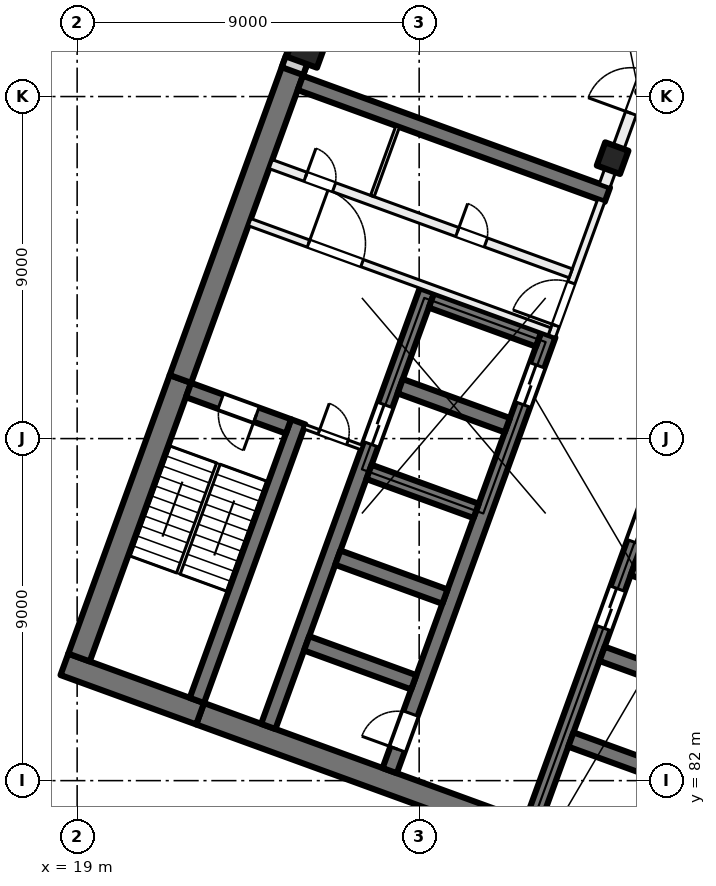
"""IFC4 building model, lengths in metres.
Left out: names, types, materials, properties, quantities, classifications, styles, units other than length and angle.
Written with IfcOpenShell. Run it as: python <this file> out.ifc"""

import sys

from ifc_helpers import new_model, si_unit, direction, frame, frame_2d, origin, origin_2d, place, context, subcontext, project, spatial, rectangle, extrude, element, fill, save


model = new_model("IFC4")
c1 = context("Model", 3, precision=1e-05, world=origin(), true_north=direction((0.0, 1.0)))
c2 = subcontext(c1, "Body", "Model", "MODEL_VIEW")
j1 = project(units=[si_unit("LENGTHUNIT", "METRE"), si_unit("PLANEANGLEUNIT", "RADIAN")], contexts=[c1])
p1 = place(None, origin())
s1 = spatial("IfcSite", under=j1, at=p1, CompositionType="ELEMENT")
p2 = place(p1, origin())
s2 = spatial("IfcBuilding", under=s1, at=p2, CompositionType="ELEMENT")
p3 = place(p2, frame((0.0, 0.0, 113.0)))
s3 = spatial("IfcBuildingStorey", under=s2, at=p3, CompositionType="ELEMENT", Elevation=113.0)
p4 = place(p3, frame((33.091, 98.379, 0.0), z_axis=(0.0, 0.0, 1.0), x_axis=(-0.342020143326, -0.939692620786, 0.0)))
e1 = element("IfcColumn", 1, at=p4, inside=s3, PredefinedType="COLUMN", context=c2, shape_type="SweptSolid", body=[
    extrude(rectangle(XDim=0.65, YDim=0.65, at=origin_2d()), origin(), (0.0, 0.0, 1.0), 4.0),
])
p5 = place(p3, frame((25.056, 101.303, 0.0), z_axis=(0.0, 0.0, 1.0), x_axis=(-0.342020143326, -0.939692620786, 0.0)))
e2 = element("IfcColumn", 2, at=p5, inside=s3, PredefinedType="COLUMN", context=c2, shape_type="SweptSolid", body=[
    extrude(rectangle(XDim=0.85, YDim=0.85, at=origin_2d()), origin(), (0.0, 0.0, 1.0), 4.0),
])
p6 = place(p3, frame((35.767, 78.835, 0.0), z_axis=(0.0, 0.0, 1.0), x_axis=(-0.939692894512, 0.342019391267, 0.0)))
e3 = element("IfcWall", 3, at=p6, inside=s3, PredefinedType="SHEAR", context=c2, shape_type="SweptSolid", body=[
    extrude(rectangle(XDim=14.4, YDim=0.6, at=frame_2d((7.2, 0.0))), origin(), (0.0, 0.0, 1.0), 4.0),
])
p7 = place(p3, frame((22.236, 83.76, 0.0), z_axis=(0.0, 0.0, 1.0), x_axis=(-0.939680822529, 0.342052557032, 0.0)))
e4 = element("IfcWall", 4, at=p7, inside=s3, PredefinedType="SHEAR", context=c2, shape_type="SweptSolid", body=[
    extrude(rectangle(XDim=3.8, YDim=0.6, at=frame_2d((1.9, 0.0))), origin(), (0.0, 0.0, 1.0), 4.0),
])
p8 = place(p3, frame((19.05, 85.239, 0.0), z_axis=(0.0, 0.0, 1.0), x_axis=(0.342016982193, 0.939693771338, 0.0)))
e5 = element("IfcWall", 5, at=p8, inside=s3, PredefinedType="SHEAR", context=c2, shape_type="SweptSolid", body=[
    extrude(rectangle(XDim=7.8, YDim=0.6, at=frame_2d((3.9, 0.0))), origin(), (0.0, 0.0, 1.0), 4.0),
])
p9 = place(p3, frame((21.717, 92.568, 0.0), z_axis=(0.0, 0.0, 1.0), x_axis=(0.342017595281, 0.939693548195, 0.0)))
e6 = element("IfcWall", 6, at=p9, inside=s3, PredefinedType="SHEAR", context=c2, shape_type="SweptSolid", body=[
    extrude(rectangle(XDim=8.925, YDim=0.6, at=frame_2d((4.462, 0.0))), origin(), (0.0, 0.0, 1.0), 4.0),
])
p10 = place(p3, frame((22.15, 84.11, 0.0), z_axis=(0.0, 0.0, 1.0), x_axis=(0.342016982193, 0.939693771338, 0.0)))
e7 = element("IfcWall", 7, at=p10, inside=s3, PredefinedType="SHEAR", context=c2, shape_type="SweptSolid", body=[
    extrude(rectangle(XDim=7.8, YDim=0.4, at=frame_2d((3.9, 0.0))), origin(), (0.0, 0.0, 1.0), 4.0),
])
p11 = place(p3, frame((24.562, 91.32, 0.0), z_axis=(0.0, 0.0, 1.0), x_axis=(-0.939717030584, 0.341953070509, 0.0)))
e8 = element("IfcWall", 8, at=p11, inside=s3, PredefinedType="SHEAR", context=c2, shape_type="SweptSolid", body=[
    extrude(rectangle(XDim=2.8, YDim=0.4, at=frame_2d((1.4, 0.0))), origin(), (0.0, 0.0, 1.0), 4.0),
])
p12 = place(p11, frame((0.9, 0.0, 0.0)))
e9 = element("IfcOpeningElement", 9, at=p12, cuts=e8, PredefinedType="OPENING", context=c2, shape_type="SweptSolid", body=[
    extrude(rectangle(XDim=1.0, YDim=2.1, at=frame_2d((0.5, 1.05))), frame((0.0, 0.21, 0.0), z_axis=(0.0, -1.0, 0.0), x_axis=(1.0, 0.0, 0.0)), (0.0, 0.0, 1.0), 0.42),
])
p13 = place(p3, frame((30.984, 80.895, 0.0), z_axis=(0.0, 0.0, 1.0), x_axis=(0.342021021735, 0.939692301071, 0.0)))
e10 = element("IfcWall", 10, at=p13, inside=s3, PredefinedType="SHEAR", context=c2, shape_type="SweptSolid", body=[
    extrude(rectangle(XDim=12.2, YDim=0.4, at=frame_2d((6.1, 0.0))), origin(), (0.0, 0.0, 1.0), 4.0),
])
p14 = place(p13, frame((5.45, 0.0, 0.0)))
e11 = element("IfcOpeningElement", 11, at=p14, cuts=e10, PredefinedType="OPENING", context=c2, shape_type="SweptSolid", body=[
    extrude(rectangle(XDim=1.1, YDim=2.1, at=frame_2d((0.55, 1.05))), frame((0.0, 0.21, 0.0), z_axis=(0.0, -1.0, 0.0), x_axis=(1.0, 0.0, 0.0)), (0.0, 0.0, 1.0), 0.42),
])
p15 = place(p13, frame((7.85, 0.0, 0.0)))
e12 = element("IfcOpeningElement", 12, at=p15, cuts=e10, PredefinedType="OPENING", context=c2, shape_type="SweptSolid", body=[
    extrude(rectangle(XDim=1.1, YDim=2.1, at=frame_2d((0.55, 1.05))), frame((0.0, 0.21, 0.0), z_axis=(0.0, -1.0, 0.0), x_axis=(1.0, 0.0, 0.0)), (0.0, 0.0, 1.0), 0.42),
])
p16 = place(p13, frame((10.25, 0.0, 0.0)))
e13 = element("IfcOpeningElement", 13, at=p16, cuts=e10, PredefinedType="OPENING", context=c2, shape_type="SweptSolid", body=[
    extrude(rectangle(XDim=1.1, YDim=2.1, at=frame_2d((0.55, 1.05))), frame((0.0, 0.21, 0.0), z_axis=(0.0, -1.0, 0.0), x_axis=(1.0, 0.0, 0.0)), (0.0, 0.0, 1.0), 0.42),
])
for number, where, z_axis, x_axis in (
    (14, (34.812, 82.056, 0.0), (0.0, 0.0, 1.0), (-0.94, 0.342, 0.0)),
    (15, (35.632, 84.311, 0.0), (0.0, 0.0, 1.0), (-0.94, 0.342, 0.0)),
    (16, (36.453, 86.566, 0.0), (0.0, 0.0, 1.0), (-0.94, 0.342, 0.0)),
):
    element("IfcWall", number, at=place(p3, frame(where, z_axis=z_axis, x_axis=x_axis)), inside=s3, PredefinedType="SHEAR", context=c2, shape_type="SweptSolid", body=[
        extrude(rectangle(XDim=3.0, YDim=0.4, at=frame_2d((1.5, 0.0))), origin(), (0.0, 0.0, 1.0), 4.0),
    ])
p17 = place(p3, frame((27.225, 82.263, 0.0), z_axis=(0.0, 0.0, 1.0), x_axis=(0.342014590177, 0.939694641948, 0.0)))
e17 = element("IfcWall", 17, at=p17, inside=s3, PredefinedType="SHEAR", context=c2, shape_type="SweptSolid", body=[
    extrude(rectangle(XDim=12.2, YDim=0.4, at=frame_2d((6.1, 0.0))), origin(), (0.0, 0.0, 1.0), 4.0),
])
p18 = place(p17, frame((10.25, 0.0, 0.0)))
e18 = element("IfcOpeningElement", 18, at=p18, cuts=e17, PredefinedType="OPENING", context=c2, shape_type="SweptSolid", body=[
    extrude(rectangle(XDim=1.1, YDim=2.1, at=frame_2d((0.55, 1.05))), frame((0.0, 0.21, 0.0), z_axis=(0.0, -1.0, 0.0), x_axis=(1.0, 0.0, 0.0)), (0.0, 0.0, 1.0), 0.42),
])
p19 = place(p17, frame((0.6, 0.0, 0.0)))
e19 = element("IfcOpeningElement", 19, at=p19, cuts=e17, PredefinedType="OPENING", context=c2, shape_type="SweptSolid", body=[
    extrude(rectangle(XDim=1.0, YDim=2.1, at=frame_2d((0.5, 1.05))), frame((0.0, 0.21, 0.0), z_axis=(0.0, -1.0, 0.0), x_axis=(1.0, 0.0, 0.0)), (0.0, 0.0, 1.0), 0.42),
])
p20 = place(p3, frame((24.03, 83.426, 0.0), z_axis=(0.0, 0.0, 1.0), x_axis=(0.342014590177, 0.939694641948, 0.0)))
e20 = element("IfcWall", 20, at=p20, inside=s3, PredefinedType="SHEAR", context=c2, shape_type="SweptSolid", body=[
    extrude(rectangle(XDim=12.2, YDim=0.4, at=frame_2d((6.1, 0.0))), origin(), (0.0, 0.0, 1.0), 4.0),
])
p21 = place(p20, frame((7.9, 0.0, 0.0)))
e21 = element("IfcOpeningElement", 21, at=p21, cuts=e20, PredefinedType="OPENING", context=c2, shape_type="SweptSolid", body=[
    extrude(rectangle(XDim=1.1, YDim=2.1, at=frame_2d((0.55, 1.05))), frame((0.0, 0.21, 0.0), z_axis=(0.0, -1.0, 0.0), x_axis=(1.0, 0.0, 0.0)), (0.0, 0.0, 1.0), 0.42),
])
p22 = place(p3, frame((27.858, 84.587, 0.0), z_axis=(0.0, 0.0, 1.0), x_axis=(-0.939686455819, 0.342037080957, 0.0)))
e22 = element("IfcWall", 22, at=p22, inside=s3, PredefinedType="SHEAR", context=c2, shape_type="SweptSolid", body=[
    extrude(rectangle(XDim=3.0, YDim=0.4, at=frame_2d((1.5, 0.0))), origin(), (0.0, 0.0, 1.0), 4.0),
])
p23 = place(p3, frame((28.678, 86.842, 0.0), z_axis=(0.0, 0.0, 1.0), x_axis=(-0.939676934218, 0.342063238742, 0.0)))
e23 = element("IfcWall", 23, at=p23, inside=s3, PredefinedType="SHEAR", context=c2, shape_type="SweptSolid", body=[
    extrude(rectangle(XDim=3.0, YDim=0.4, at=frame_2d((1.5, 0.0))), origin(), (0.0, 0.0, 1.0), 4.0),
])
for number, where, z_axis, x_axis in (
    (24, (29.5, 89.097, 0.0), (0.0, 0.0, 1.0), (-0.94, 0.342, 0.0)),
    (25, (30.32, 91.353, 0.0), (0.0, 0.0, 1.0), (-0.94, 0.342, 0.0)),
    (26, (31.141, 93.608, 0.0), (0.0, 0.0, 1.0), (-0.94, 0.342, 0.0)),
):
    element("IfcWall", number, at=place(p3, frame(where, z_axis=z_axis, x_axis=x_axis)), inside=s3, PredefinedType="SHEAR", context=c2, shape_type="SweptSolid", body=[
        extrude(rectangle(XDim=3.0, YDim=0.4, at=frame_2d((1.5, 0.0))), origin(), (0.0, 0.0, 1.0), 4.0),
    ])
p24 = place(p3, frame((32.953, 97.418, 0.0), z_axis=(0.0, 0.0, 1.0), x_axis=(-0.93969060187, 0.342025690201, 0.0)))
e27 = element("IfcWall", 27, at=p24, inside=s3, PredefinedType="SHEAR", context=c2, shape_type="SweptSolid", body=[
    extrude(rectangle(XDim=8.6, YDim=0.4, at=frame_2d((4.3, 0.0))), origin(), (0.0, 0.0, 1.0), 4.0),
])
p25 = place(p3, frame((24.666, 100.669, 0.0), z_axis=(0.0, 0.0, 1.0), x_axis=(0.34201964167, 0.939692803373, 0.0)))
e28 = element("IfcWall", 28, at=p25, inside=s3, PredefinedType="SOLIDWALL", context=c2, shape_type="SweptSolid", body=[
    extrude(rectangle(XDim=32.884, YDim=0.6, at=frame_2d((16.442, 0.0))), origin(), (0.0, 0.0, 1.0), 3.625),
])
p26 = place(p25, frame((1.48, 0.0, 0.9)))
e29 = element("IfcOpeningElement", 29, at=p26, cuts=e28, PredefinedType="OPENING", context=c2, shape_type="SweptSolid", body=[
    extrude(rectangle(XDim=3.0, YDim=2.4, at=frame_2d((1.5, 1.2))), frame((0.0, 0.31, 0.0), z_axis=(0.0, -1.0, 0.0), x_axis=(1.0, 0.0, 0.0)), (0.0, 0.0, 1.0), 0.62),
])
p27 = place(p25, frame((5.98, 0.0, 0.9)))
e30 = element("IfcOpeningElement", 30, at=p27, cuts=e28, PredefinedType="OPENING", context=c2, shape_type="SweptSolid", body=[
    extrude(rectangle(XDim=3.0, YDim=2.4, at=frame_2d((1.5, 1.2))), frame((0.0, 0.31, 0.0), z_axis=(0.0, -1.0, 0.0), x_axis=(1.0, 0.0, 0.0)), (0.0, 0.0, 1.0), 0.62),
])
p28 = place(p25, frame((10.48, 0.0, 0.9)))
e31 = element("IfcOpeningElement", 31, at=p28, cuts=e28, PredefinedType="OPENING", context=c2, shape_type="SweptSolid", body=[
    extrude(rectangle(XDim=3.0, YDim=2.4, at=frame_2d((1.5, 1.2))), frame((0.0, 0.31, 0.0), z_axis=(0.0, -1.0, 0.0), x_axis=(1.0, 0.0, 0.0)), (0.0, 0.0, 1.0), 0.62),
])
p29 = place(p25, frame((14.98, 0.0, 0.9)))
e32 = element("IfcOpeningElement", 32, at=p29, cuts=e28, PredefinedType="OPENING", context=c2, shape_type="SweptSolid", body=[
    extrude(rectangle(XDim=3.0, YDim=2.4, at=frame_2d((1.5, 1.2))), frame((0.0, 0.31, 0.0), z_axis=(0.0, -1.0, 0.0), x_axis=(1.0, 0.0, 0.0)), (0.0, 0.0, 1.0), 0.62),
])
p30 = place(p25, frame((19.48, 0.0, 0.9)))
e33 = element("IfcOpeningElement", 33, at=p30, cuts=e28, PredefinedType="OPENING", context=c2, shape_type="SweptSolid", body=[
    extrude(rectangle(XDim=3.0, YDim=2.4, at=frame_2d((1.5, 1.2))), frame((0.0, 0.31, 0.0), z_axis=(0.0, -1.0, 0.0), x_axis=(1.0, 0.0, 0.0)), (0.0, 0.0, 1.0), 0.62),
])
p31 = place(p25, frame((23.98, 0.0, 0.9)))
e34 = element("IfcOpeningElement", 34, at=p31, cuts=e28, PredefinedType="OPENING", context=c2, shape_type="SweptSolid", body=[
    extrude(rectangle(XDim=3.0, YDim=2.4, at=frame_2d((1.5, 1.2))), frame((0.0, 0.31, 0.0), z_axis=(0.0, -1.0, 0.0), x_axis=(1.0, 0.0, 0.0)), (0.0, 0.0, 1.0), 0.62),
])
p32 = place(p25, frame((28.48, 0.0, 0.9)))
e35 = element("IfcOpeningElement", 35, at=p32, cuts=e28, PredefinedType="OPENING", context=c2, shape_type="SweptSolid", body=[
    extrude(rectangle(XDim=3.0, YDim=2.4, at=frame_2d((1.5, 1.2))), frame((0.0, 0.31, 0.0), z_axis=(0.0, -1.0, 0.0), x_axis=(1.0, 0.0, 0.0)), (0.0, 0.0, 1.0), 0.62),
])
p33 = place(p3, frame((31.491, 93.693, 0.0), z_axis=(0.0, 0.0, 1.0), x_axis=(0.341995824804, 0.939701471648, 0.0)))
e36 = element("IfcWall", 36, at=p33, inside=s3, PredefinedType="PARTITIONING", context=c2, shape_type="SweptSolid", body=[
    extrude(rectangle(XDim=3.8, YDim=0.2, at=frame_2d((1.9, 0.0))), origin(), (0.0, 0.0, 1.0), 3.625),
])
p34 = place(p33, frame((0.3, 0.0, 0.0)))
e37 = element("IfcOpeningElement", 37, at=p34, cuts=e36, PredefinedType="OPENING", context=c2, shape_type="SweptSolid", body=[
    extrude(rectangle(XDim=1.2, YDim=2.1, at=frame_2d((0.6, 1.05))), frame((0.0, 0.11, 0.0), z_axis=(0.0, -1.0, 0.0), x_axis=(1.0, 0.0, 0.0)), (0.0, 0.0, 1.0), 0.22),
])
p35 = place(p3, frame((23.538, 96.694, 0.0), z_axis=(0.0, 0.0, 1.0), x_axis=(0.939691552312, -0.342023078919, 0.0)))
e38 = element("IfcWall", 38, at=p35, inside=s3, PredefinedType="PARTITIONING", context=c2, shape_type="SweptSolid", body=[
    extrude(rectangle(XDim=8.4, YDim=0.2, at=frame_2d((4.2, 0.0))), origin(), (0.0, 0.0, 1.0), 3.625),
])
p36 = place(p35, frame((1.65, 0.0, 0.0)))
e39 = element("IfcOpeningElement", 39, at=p36, cuts=e38, PredefinedType="OPENING", context=c2, shape_type="SweptSolid", body=[
    extrude(rectangle(XDim=1.5, YDim=2.1, at=frame_2d((0.75, 1.05))), frame((0.0, 0.11, 0.0), z_axis=(0.0, -1.0, 0.0), x_axis=(1.0, 0.0, 0.0)), (0.0, 0.0, 1.0), 0.22),
])
p37 = place(p3, frame((24.094, 98.221, 0.0), z_axis=(0.0, 0.0, 1.0), x_axis=(0.939691552312, -0.342023078919, 0.0)))
e40 = element("IfcWall", 40, at=p37, inside=s3, PredefinedType="PARTITIONING", context=c2, shape_type="SweptSolid", body=[
    extrude(rectangle(XDim=8.4, YDim=0.25, at=frame_2d((4.2, 0.0))), origin(), (0.0, 0.0, 1.0), 3.625),
])
p38 = place(p37, frame((5.225, 0.0, 0.0)))
e41 = element("IfcOpeningElement", 41, at=p38, cuts=e40, PredefinedType="OPENING", context=c2, shape_type="SweptSolid", body=[
    extrude(rectangle(XDim=0.8, YDim=2.1, at=frame_2d((0.4, 1.05))), frame((0.0, 0.135, 0.0), z_axis=(0.0, -1.0, 0.0), x_axis=(1.0, 0.0, 0.0)), (0.0, 0.0, 1.0), 0.27),
])
p39 = place(p37, frame((0.975, 0.0, 0.0)))
e42 = element("IfcOpeningElement", 42, at=p39, cuts=e40, PredefinedType="OPENING", context=c2, shape_type="SweptSolid", body=[
    extrude(rectangle(XDim=0.8, YDim=2.1, at=frame_2d((0.4, 1.05))), frame((0.0, 0.135, 0.0), z_axis=(0.0, -1.0, 0.0), x_axis=(1.0, 0.0, 0.0)), (0.0, 0.0, 1.0), 0.27),
])
p40 = place(p3, frame((24.985, 91.312, 0.0), z_axis=(0.0, 0.0, 1.0), x_axis=(0.939708740826, -0.341975850632, 0.0)))
e43 = element("IfcWall", 43, at=p40, inside=s3, PredefinedType="PARTITIONING", context=c2, shape_type="SweptSolid", body=[
    extrude(rectangle(XDim=1.6, YDim=0.125, at=frame_2d((0.8, 0.0))), origin(), (0.0, 0.0, 1.0), 3.625),
])
p41 = place(p40, frame((0.4, 0.0, 0.0)))
e44 = element("IfcOpeningElement", 44, at=p41, cuts=e43, PredefinedType="OPENING", context=c2, shape_type="SweptSolid", body=[
    extrude(rectangle(XDim=0.8, YDim=2.1, at=frame_2d((0.4, 1.05))), frame((0.0, 0.073, 0.0), z_axis=(0.0, -1.0, 0.0), x_axis=(1.0, 0.0, 0.0)), (0.0, 0.0, 1.0), 0.145),
])
p42 = place(p3, frame((26.768, 97.381, 0.0), z_axis=(0.0, 0.0, 1.0), x_axis=(0.342024501273, 0.939691034611, 0.0)))
e45 = element("IfcWall", 45, at=p42, inside=s3, PredefinedType="PARTITIONING", context=c2, shape_type="SweptSolid", body=[
    extrude(rectangle(XDim=1.95, YDim=0.1, at=frame_2d((0.975, 0.0))), origin(), (0.0, 0.0, 1.0), 3.625),
])
p43 = place(p3, frame((32.881, 97.657, 0.0), z_axis=(0.0, 0.0, 1.0), x_axis=(0.342017360004, 0.939693633828, 0.0)))
e46 = element("IfcWall", 46, at=p43, inside=s3, PredefinedType="PARTITIONING", context=c2, shape_type="SweptSolid", body=[
    extrude(rectangle(XDim=34.516, YDim=0.3, at=frame_2d((17.258, 0.0))), origin(), (0.0, 0.0, 1.0), 3.625),
])
p44 = place(p43, frame((2.025, 0.0, 0.0)))
e47 = element("IfcOpeningElement", 47, at=p44, cuts=e46, PredefinedType="OPENING", context=c2, shape_type="SweptSolid", body=[
    extrude(rectangle(XDim=1.2, YDim=2.1, at=frame_2d((0.6, 1.05))), frame((0.0, 0.16, 0.0), z_axis=(0.0, -1.0, 0.0), x_axis=(1.0, 0.0, 0.0)), (0.0, 0.0, 1.0), 0.32),
])
p45 = place(p43, frame((7.0, 0.0, 0.0)))
e48 = element("IfcOpeningElement", 48, at=p45, cuts=e46, PredefinedType="OPENING", context=c2, shape_type="SweptSolid", body=[
    extrude(rectangle(XDim=1.0, YDim=2.1, at=frame_2d((0.5, 1.05))), frame((0.0, 0.16, 0.0), z_axis=(0.0, -1.0, 0.0), x_axis=(1.0, 0.0, 0.0)), (0.0, 0.0, 1.0), 0.32),
])
p46 = place(p43, frame((11.5, 0.0, 0.0)))
e49 = element("IfcOpeningElement", 49, at=p46, cuts=e46, PredefinedType="OPENING", context=c2, shape_type="SweptSolid", body=[
    extrude(rectangle(XDim=1.0, YDim=2.1, at=frame_2d((0.5, 1.05))), frame((0.0, 0.16, 0.0), z_axis=(0.0, -1.0, 0.0), x_axis=(1.0, 0.0, 0.0)), (0.0, 0.0, 1.0), 0.32),
])
p47 = place(p43, frame((16.0, 0.0, 0.0)))
e50 = element("IfcOpeningElement", 50, at=p47, cuts=e46, PredefinedType="OPENING", context=c2, shape_type="SweptSolid", body=[
    extrude(rectangle(XDim=1.0, YDim=2.1, at=frame_2d((0.5, 1.05))), frame((0.0, 0.16, 0.0), z_axis=(0.0, -1.0, 0.0), x_axis=(1.0, 0.0, 0.0)), (0.0, 0.0, 1.0), 0.32),
])
p48 = place(p43, frame((20.5, 0.0, 0.0)))
e51 = element("IfcOpeningElement", 51, at=p48, cuts=e46, PredefinedType="OPENING", context=c2, shape_type="SweptSolid", body=[
    extrude(rectangle(XDim=1.0, YDim=2.1, at=frame_2d((0.5, 1.05))), frame((0.0, 0.16, 0.0), z_axis=(0.0, -1.0, 0.0), x_axis=(1.0, 0.0, 0.0)), (0.0, 0.0, 1.0), 0.32),
])
p49 = place(p43, frame((25.0, 0.0, 0.0)))
e52 = element("IfcOpeningElement", 52, at=p49, cuts=e46, PredefinedType="OPENING", context=c2, shape_type="SweptSolid", body=[
    extrude(rectangle(XDim=1.0, YDim=2.1, at=frame_2d((0.5, 1.05))), frame((0.0, 0.16, 0.0), z_axis=(0.0, -1.0, 0.0), x_axis=(1.0, 0.0, 0.0)), (0.0, 0.0, 1.0), 0.32),
])
p50 = place(p43, frame((29.779, 0.0, 0.0)))
e53 = element("IfcOpeningElement", 53, at=p50, cuts=e46, PredefinedType="OPENING", context=c2, shape_type="SweptSolid", body=[
    extrude(rectangle(XDim=1.8, YDim=2.1, at=frame_2d((0.9, 1.05))), frame((0.0, 0.16, 0.0), z_axis=(0.0, -1.0, 0.0), x_axis=(1.0, 0.0, 0.0)), (0.0, 0.0, 1.0), 0.32),
])
p51 = place(p18, origin())
e54 = element("IfcDoor", 54, at=p51, inside=s3, OperationType="DOUBLE_DOOR_SLIDING", PredefinedType="DOOR", context=c2, shape_type="SweptSolid", body=[
    extrude(rectangle(XDim=1.1, YDim=2.1, at=frame_2d((0.55, 1.05))), frame((0.0, 0.025, 0.0), z_axis=(0.0, -1.0, 0.0), x_axis=(1.0, 0.0, 0.0)), (0.0, 0.0, 1.0), 0.05),
])
fill(e18, e54)
p52 = place(p14, origin())
e55 = element("IfcDoor", 55, at=p52, inside=s3, OperationType="DOUBLE_DOOR_SLIDING", PredefinedType="DOOR", context=c2, shape_type="SweptSolid", body=[
    extrude(rectangle(XDim=1.1, YDim=2.1, at=frame_2d((0.55, 1.05))), frame((0.0, 0.025, 0.0), z_axis=(0.0, -1.0, 0.0), x_axis=(1.0, 0.0, 0.0)), (0.0, 0.0, 1.0), 0.05),
])
fill(e11, e55)
p53 = place(p15, origin())
e56 = element("IfcDoor", 56, at=p53, inside=s3, OperationType="DOUBLE_DOOR_SLIDING", PredefinedType="DOOR", context=c2, shape_type="SweptSolid", body=[
    extrude(rectangle(XDim=1.1, YDim=2.1, at=frame_2d((0.55, 1.05))), frame((0.0, 0.025, 0.0), z_axis=(0.0, -1.0, 0.0), x_axis=(1.0, 0.0, 0.0)), (0.0, 0.0, 1.0), 0.05),
])
fill(e12, e56)
p54 = place(p19, origin())
e57 = element("IfcDoor", 57, at=p54, inside=s3, OperationType="SINGLE_SWING_LEFT", PredefinedType="DOOR", context=c2, shape_type="SweptSolid", body=[
    extrude(rectangle(XDim=1.0, YDim=2.1, at=frame_2d((0.5, 1.05))), frame((0.0, 0.025, 0.0), z_axis=(0.0, -1.0, 0.0), x_axis=(1.0, 0.0, 0.0)), (0.0, 0.0, 1.0), 0.05),
])
fill(e19, e57)
p55 = place(p34, origin())
e58 = element("IfcDoor", 58, at=p55, inside=s3, OperationType="DOUBLE_DOOR_SINGLE_SWING", PredefinedType="DOOR", context=c2, shape_type="SweptSolid", body=[
    extrude(rectangle(XDim=1.2, YDim=2.1, at=frame_2d((0.6, 1.05))), frame((0.0, 0.025, 0.0), z_axis=(0.0, -1.0, 0.0), x_axis=(1.0, 0.0, 0.0)), (0.0, 0.0, 1.0), 0.05),
])
fill(e37, e58)
p56 = place(p36, origin())
e59 = element("IfcDoor", 59, at=p56, inside=s3, OperationType="DOUBLE_DOOR_SINGLE_SWING", PredefinedType="DOOR", context=c2, shape_type="SweptSolid", body=[
    extrude(rectangle(XDim=1.5, YDim=2.1, at=frame_2d((0.75, 1.05))), frame((0.0, 0.025, 0.0), z_axis=(0.0, -1.0, 0.0), x_axis=(1.0, 0.0, 0.0)), (0.0, 0.0, 1.0), 0.05),
])
fill(e39, e59)
p57 = place(p12, origin())
e60 = element("IfcDoor", 60, at=p57, inside=s3, OperationType="SINGLE_SWING_LEFT", PredefinedType="DOOR", context=c2, shape_type="SweptSolid", body=[
    extrude(rectangle(XDim=1.0, YDim=2.1, at=frame_2d((0.5, 1.05))), frame((0.0, 0.025, 0.0), z_axis=(0.0, -1.0, 0.0), x_axis=(1.0, 0.0, 0.0)), (0.0, 0.0, 1.0), 0.05),
])
fill(e9, e60)
p58 = place(p41, origin())
e61 = element("IfcDoor", 61, at=p58, inside=s3, OperationType="SINGLE_SWING_RIGHT", PredefinedType="DOOR", context=c2, shape_type="SweptSolid", body=[
    extrude(rectangle(XDim=0.8, YDim=2.1, at=frame_2d((0.4, 1.05))), frame((0.0, 0.025, 0.0), z_axis=(0.0, -1.0, 0.0), x_axis=(1.0, 0.0, 0.0)), (0.0, 0.0, 1.0), 0.05),
])
fill(e44, e61)
p59 = place(p38, origin())
e62 = element("IfcDoor", 62, at=p59, inside=s3, OperationType="SINGLE_SWING_LEFT", PredefinedType="DOOR", context=c2, shape_type="SweptSolid", body=[
    extrude(rectangle(XDim=0.8, YDim=2.1, at=frame_2d((0.4, 1.05))), frame((0.0, 0.025, 0.0), z_axis=(0.0, -1.0, 0.0), x_axis=(1.0, 0.0, 0.0)), (0.0, 0.0, 1.0), 0.05),
])
fill(e41, e62)
p60 = place(p39, origin())
e63 = element("IfcDoor", 63, at=p60, inside=s3, OperationType="SINGLE_SWING_RIGHT", PredefinedType="DOOR", context=c2, shape_type="SweptSolid", body=[
    extrude(rectangle(XDim=0.8, YDim=2.1, at=frame_2d((0.4, 1.05))), frame((0.0, 0.025, 0.0), z_axis=(0.0, -1.0, 0.0), x_axis=(1.0, 0.0, 0.0)), (0.0, 0.0, 1.0), 0.05),
])
fill(e42, e63)
p61 = place(p21, origin())
e64 = element("IfcDoor", 64, at=p61, inside=s3, OperationType="DOUBLE_DOOR_SLIDING", PredefinedType="DOOR", context=c2, shape_type="SweptSolid", body=[
    extrude(rectangle(XDim=1.1, YDim=2.1, at=frame_2d((0.55, 1.05))), frame((0.0, 0.025, 0.0), z_axis=(0.0, -1.0, 0.0), x_axis=(1.0, 0.0, 0.0)), (0.0, 0.0, 1.0), 0.05),
])
fill(e21, e64)
p62 = place(p44, origin())
e65 = element("IfcDoor", 65, at=p62, inside=s3, OperationType="DOUBLE_DOOR_SINGLE_SWING", PredefinedType="DOOR", context=c2, shape_type="SweptSolid", body=[
    extrude(rectangle(XDim=1.2, YDim=2.1, at=frame_2d((0.6, 1.05))), frame((0.0, 0.025, 0.0), z_axis=(0.0, -1.0, 0.0), x_axis=(1.0, 0.0, 0.0)), (0.0, 0.0, 1.0), 0.05),
])
fill(e47, e65)
save(model, sys.argv[1])
